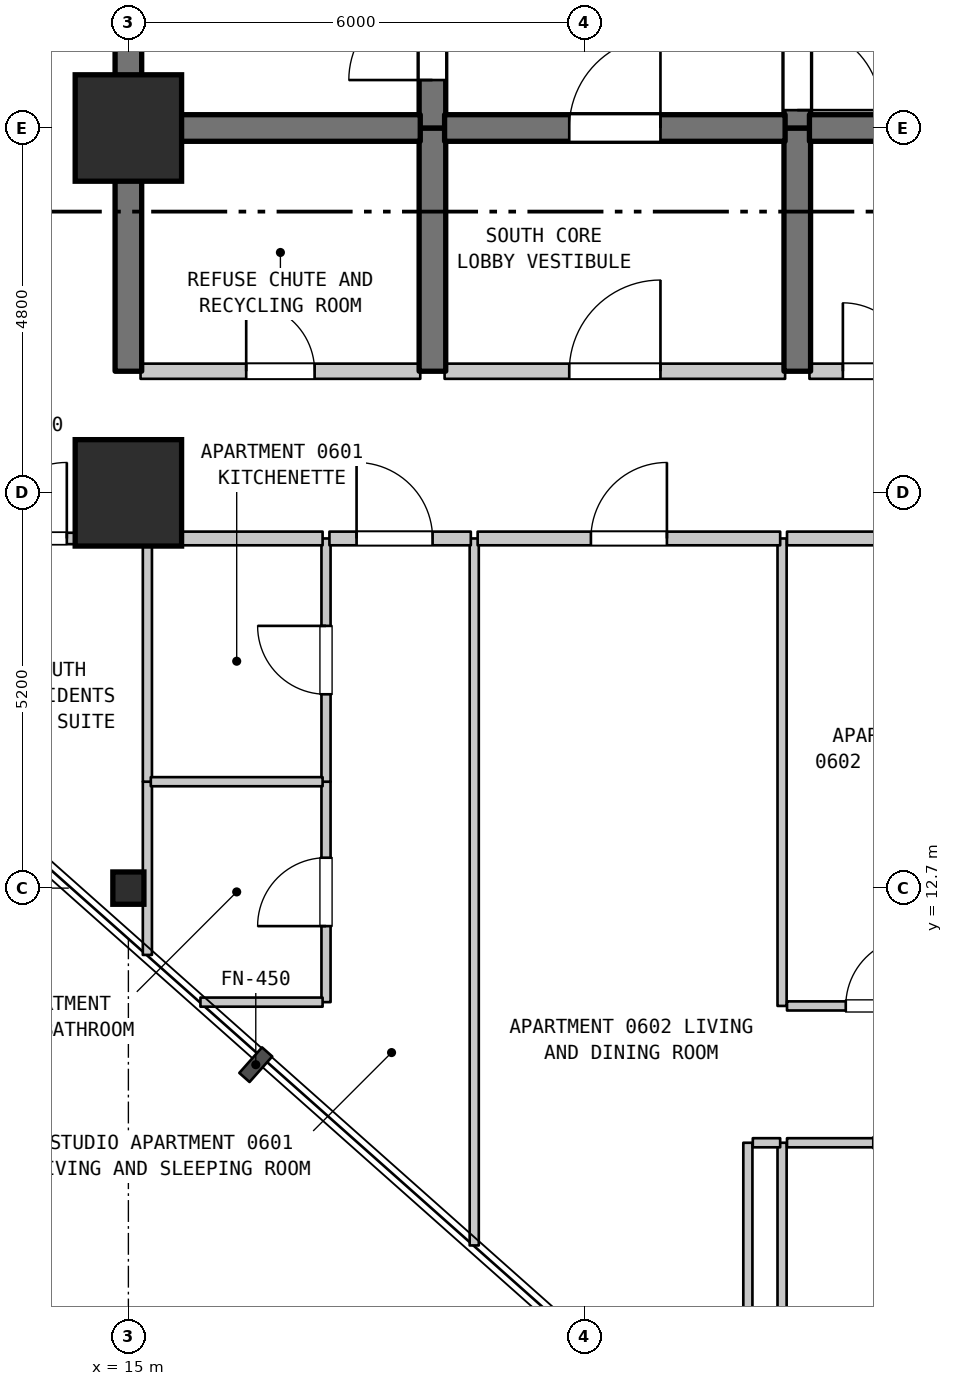
"""IFC4 building model, lengths in metres.
Left out: names, types, materials, properties, quantities, classifications, styles, units other than length and angle.
Written with IfcOpenShell. Run it as: python <this file> out.ifc"""

import sys

from ifc_helpers import new_model, si_unit, direction, frame, frame_2d, origin, origin_2d, place, context, subcontext, project, spatial, rectangle, i_section, extrude, element, fill, save


model = new_model("IFC4")
c1 = context("Model", 3, precision=1e-05, world=origin(), true_north=direction((0.0, 1.0)))
c2 = subcontext(c1, "Body", "Model", "MODEL_VIEW")
j1 = project(units=[si_unit("LENGTHUNIT", "METRE"), si_unit("PLANEANGLEUNIT", "RADIAN")], contexts=[c1])
p1 = place(None, origin())
s1 = spatial("IfcSite", under=j1, at=p1, CompositionType="ELEMENT")
p2 = place(p1, origin())
s2 = spatial("IfcBuilding", under=s1, at=p2, CompositionType="ELEMENT")
p3 = place(p2, frame((0.0, 0.0, 31.4)))
s3 = spatial("IfcBuildingStorey", under=s2, at=p3, CompositionType="ELEMENT", Elevation=31.4)
p4 = place(p3, frame((15.0, 12.7, 0.0), z_axis=(0.0, 0.0, 1.0), x_axis=(1.0, 0.0, 0.0)))
e1 = element("IfcColumn", 1, at=p4, inside=s3, PredefinedType="COLUMN", context=c2, shape_type="SweptSolid", body=[
    extrude(i_section(OverallWidth=0.409, OverallDepth=0.425, WebThickness=0.032, FlangeThickness=0.052, FilletRadius=0.015, at=origin_2d()), origin(), (0.0, 0.0, 1.0), 3.7),
])
for number, where, z_axis, x_axis in (
    (2, (15.0, 17.9, 0.0), (0.0, 0.0, 1.0), (1.0, 0.0, 0.0)),
    (3, (15.0, 22.7, 0.0), (0.0, 0.0, 1.0), (1.0, 0.0, 0.0)),
):
    element("IfcColumn", number, at=place(p3, frame(where, z_axis=z_axis, x_axis=x_axis)), inside=s3, PredefinedType="COLUMN", context=c2, shape_type="SweptSolid", body=[
        extrude(rectangle(XDim=1.4, YDim=1.4, at=origin_2d()), origin(), (0.0, 0.0, 1.0), 3.7),
    ])
p5 = place(p3, frame((15.0, 19.5, 0.0), z_axis=(0.0, 0.0, 1.0), x_axis=(0.0, 1.0, 0.0)))
e4 = element("IfcWall", 4, at=p5, inside=s3, PredefinedType="SHEAR", context=c2, shape_type="SweptSolid", body=[
    extrude(rectangle(XDim=3.2, YDim=0.35, at=frame_2d((1.6, 0.0))), origin(), (0.0, 0.0, 1.0), 3.385),
])
p6 = place(p3, frame((15.0, 22.7, 0.0), z_axis=(0.0, 0.0, 1.0), x_axis=(0.0, 1.0, 0.0)))
e5 = element("IfcWall", 5, at=p6, inside=s3, PredefinedType="SHEAR", context=c2, shape_type="SweptSolid", body=[
    extrude(rectangle(XDim=6.8, YDim=0.35, at=frame_2d((3.4, 0.0))), origin(), (0.0, 0.0, 1.0), 3.385),
])
p7 = place(p3, frame((15.25, 11.821, 0.0), z_axis=(0.0, 0.0, 1.0), x_axis=(0.0, 1.0, 0.0)))
e6 = element("IfcWall", 6, at=p7, inside=s3, PredefinedType="PARTITIONING", context=c2, shape_type="SweptSolid", body=[
    extrude(rectangle(XDim=2.279, YDim=0.12, at=frame_2d((1.14, 0.0))), origin(), (0.0, 0.0, 1.0), 3.385),
])
p8 = place(p3, frame((15.25, 14.1, 0.0), z_axis=(0.0, 0.0, 1.0), x_axis=(0.0, 1.0, 0.0)))
e7 = element("IfcWall", 7, at=p8, inside=s3, PredefinedType="PARTITIONING", context=c2, shape_type="SweptSolid", body=[
    extrude(rectangle(XDim=3.2, YDim=0.12, at=frame_2d((1.6, 0.0))), origin(), (0.0, 0.0, 1.0), 3.385),
])
p9 = place(p3, frame((17.6, 11.2, 0.0), z_axis=(0.0, 0.0, 1.0), x_axis=(0.0, 1.0, 0.0)))
e8 = element("IfcWall", 8, at=p9, inside=s3, PredefinedType="PARTITIONING", context=c2, shape_type="SweptSolid", body=[
    extrude(rectangle(XDim=2.9, YDim=0.12, at=frame_2d((1.45, 0.0))), origin(), (0.0, 0.0, 1.0), 3.385),
])
p10 = place(p9, frame((1.0, 0.0, 0.0)))
e9 = element("IfcOpeningElement", 9, at=p10, cuts=e8, PredefinedType="OPENING", context=c2, shape_type="SweptSolid", body=[
    extrude(rectangle(XDim=0.9, YDim=2.1, at=frame_2d((0.45, 1.05))), frame((0.0, 0.07, 0.0), z_axis=(0.0, -1.0, 0.0), x_axis=(1.0, 0.0, 0.0)), (0.0, 0.0, 1.0), 0.14),
])
p11 = place(p3, frame((17.6, 14.1, 0.0), z_axis=(0.0, 0.0, 1.0), x_axis=(0.0, 1.0, 0.0)))
e10 = element("IfcWall", 10, at=p11, inside=s3, PredefinedType="PARTITIONING", context=c2, shape_type="SweptSolid", body=[
    extrude(rectangle(XDim=3.2, YDim=0.12, at=frame_2d((1.6, 0.0))), origin(), (0.0, 0.0, 1.0), 3.385),
])
p12 = place(p11, frame((1.15, 0.0, 0.0)))
e11 = element("IfcOpeningElement", 11, at=p12, cuts=e10, PredefinedType="OPENING", context=c2, shape_type="SweptSolid", body=[
    extrude(rectangle(XDim=0.9, YDim=2.15, at=frame_2d((0.45, 1.075))), frame((0.0, 0.07, 0.0), z_axis=(0.0, -1.0, 0.0), x_axis=(1.0, 0.0, 0.0)), (0.0, 0.0, 1.0), 0.14),
])
p13 = place(p3, frame((19.0, 19.5, 0.0), z_axis=(0.0, 0.0, 1.0), x_axis=(0.0, 1.0, 0.0)))
e12 = element("IfcWall", 12, at=p13, inside=s3, PredefinedType="SHEAR", context=c2, shape_type="SweptSolid", body=[
    extrude(rectangle(XDim=3.2, YDim=0.35, at=frame_2d((1.6, 0.0))), origin(), (0.0, 0.0, 1.0), 3.385),
])
p14 = place(p3, frame((19.0, 22.7, 0.0), z_axis=(0.0, 0.0, 1.0), x_axis=(0.0, 1.0, 0.0)))
e13 = element("IfcWall", 13, at=p14, inside=s3, PredefinedType="SHEAR", context=c2, shape_type="SweptSolid", body=[
    extrude(rectangle(XDim=5.5, YDim=0.35, at=frame_2d((2.75, 0.0))), origin(), (0.0, 0.0, 1.0), 3.385),
])
p15 = place(p14, frame((0.631, 0.0, 0.0)))
e14 = element("IfcOpeningElement", 14, at=p15, cuts=e13, PredefinedType="OPENING", context=c2, shape_type="SweptSolid", body=[
    extrude(rectangle(XDim=1.1, YDim=2.15, at=frame_2d((0.55, 1.075))), frame((0.0, 0.185, 0.0), z_axis=(0.0, -1.0, 0.0), x_axis=(1.0, 0.0, 0.0)), (0.0, 0.0, 1.0), 0.37),
])
p16 = place(p3, frame((19.55, 7.999, 0.0), z_axis=(0.0, 0.0, 1.0), x_axis=(0.0, 1.0, 0.0)))
e15 = element("IfcWall", 15, at=p16, inside=s3, PredefinedType="PARTITIONING", context=c2, shape_type="SweptSolid", body=[
    extrude(rectangle(XDim=9.301, YDim=0.12, at=frame_2d((4.65, 0.0))), origin(), (0.0, 0.0, 1.0), 3.385),
])
for number, where, z_axis, x_axis in (
    (16, (23.15, 0.71, 0.0), (0.0, 0.0, 1.0), (0.0, 1.0, 0.0)),
    (17, (23.6, 0.71, 0.0), (0.0, 0.0, 1.0), (0.0, 1.0, 0.0)),
):
    element("IfcWall", number, at=place(p3, frame(where, z_axis=z_axis, x_axis=x_axis)), inside=s3, PredefinedType="PARTITIONING", context=c2, shape_type="SweptSolid", body=[
        extrude(rectangle(XDim=8.64, YDim=0.12, at=frame_2d((4.32, 0.0))), origin(), (0.0, 0.0, 1.0), 3.385),
    ])
p17 = place(p3, frame((23.6, 11.15, 0.0), z_axis=(0.0, 0.0, 1.0), x_axis=(0.0, 1.0, 0.0)))
e18 = element("IfcWall", 18, at=p17, inside=s3, PredefinedType="PARTITIONING", context=c2, shape_type="SweptSolid", body=[
    extrude(rectangle(XDim=6.15, YDim=0.12, at=frame_2d((3.075, 0.0))), origin(), (0.0, 0.0, 1.0), 3.385),
])
p18 = place(p3, frame((23.8, 19.5, 0.0), z_axis=(0.0, 0.0, 1.0), x_axis=(0.0, 1.0, 0.0)))
e19 = element("IfcWall", 19, at=p18, inside=s3, PredefinedType="SHEAR", context=c2, shape_type="SweptSolid", body=[
    extrude(rectangle(XDim=3.2, YDim=0.35, at=frame_2d((1.6, 0.0))), origin(), (0.0, 0.0, 1.0), 3.385),
])
p19 = place(p3, frame((23.8, 22.7, 0.0), z_axis=(0.0, 0.0, 1.0), x_axis=(0.0, 1.0, 0.0)))
e20 = element("IfcWall", 20, at=p19, inside=s3, PredefinedType="SHEAR", context=c2, shape_type="SweptSolid", body=[
    extrude(rectangle(XDim=5.5, YDim=0.35, at=frame_2d((2.75, 0.0))), origin(), (0.0, 0.0, 1.0), 3.385),
])
p20 = place(p19, frame((0.235, 0.0, 0.0)))
e21 = element("IfcOpeningElement", 21, at=p20, cuts=e20, PredefinedType="OPENING", context=c2, shape_type="SweptSolid", body=[
    extrude(rectangle(XDim=1.1, YDim=2.15, at=frame_2d((0.55, 1.075))), frame((0.0, 0.185, 0.0), z_axis=(0.0, -1.0, 0.0), x_axis=(1.0, 0.0, 0.0)), (0.0, 0.0, 1.0), 0.37),
])
p21 = place(p3, frame((23.215, 9.35, 0.0), z_axis=(0.0, 0.0, 1.0), x_axis=(1.0, 0.0, 0.0)))
e22 = element("IfcWall", 22, at=p21, inside=s3, PredefinedType="PARTITIONING", context=c2, shape_type="SweptSolid", body=[
    extrude(rectangle(XDim=0.36, YDim=0.12, at=frame_2d((0.18, 0.0))), origin(), (0.0, 0.0, 1.0), 3.385),
])
p22 = place(p3, frame((23.665, 9.35, 0.0), z_axis=(0.0, 0.0, 1.0), x_axis=(1.0, 0.0, 0.0)))
e23 = element("IfcWall", 23, at=p22, inside=s3, PredefinedType="PARTITIONING", context=c2, shape_type="SweptSolid", body=[
    extrude(rectangle(XDim=5.73, YDim=0.12, at=frame_2d((2.865, 0.0))), origin(), (0.0, 0.0, 1.0), 3.385),
])
p23 = place(p22, frame((1.135, 0.0, 0.0)))
e24 = element("IfcOpeningElement", 24, at=p23, cuts=e23, PredefinedType="OPENING", context=c2, shape_type="SweptSolid", body=[
    extrude(rectangle(XDim=0.9, YDim=2.15, at=frame_2d((0.45, 1.075))), frame((0.0, 0.07, 0.0), z_axis=(0.0, -1.0, 0.0), x_axis=(1.0, 0.0, 0.0)), (0.0, 0.0, 1.0), 0.14),
])
p24 = place(p22, frame((3.695, 0.0, 0.0)))
e25 = element("IfcOpeningElement", 25, at=p24, cuts=e23, PredefinedType="OPENING", context=c2, shape_type="SweptSolid", body=[
    extrude(rectangle(XDim=0.9, YDim=2.15, at=frame_2d((0.45, 1.075))), frame((0.0, 0.07, 0.0), z_axis=(0.0, -1.0, 0.0), x_axis=(1.0, 0.0, 0.0)), (0.0, 0.0, 1.0), 0.14),
])
p25 = place(p3, frame((23.665, 11.15, 0.0), z_axis=(0.0, 0.0, 1.0), x_axis=(1.0, 0.0, 0.0)))
e26 = element("IfcWall", 26, at=p25, inside=s3, PredefinedType="PARTITIONING", context=c2, shape_type="SweptSolid", body=[
    extrude(rectangle(XDim=2.587, YDim=0.12, at=frame_2d((1.293, 0.0))), origin(), (0.0, 0.0, 1.0), 3.385),
])
p26 = place(p25, frame((0.773, 0.0, 0.0)))
e27 = element("IfcOpeningElement", 27, at=p26, cuts=e26, PredefinedType="OPENING", context=c2, shape_type="SweptSolid", body=[
    extrude(rectangle(XDim=0.9, YDim=2.15, at=frame_2d((0.45, 1.075))), frame((0.0, 0.07, 0.0), z_axis=(0.0, -1.0, 0.0), x_axis=(1.0, 0.0, 0.0)), (0.0, 0.0, 1.0), 0.14),
])
p27 = place(p3, frame((15.948, 11.2, 0.0), z_axis=(0.0, 0.0, 1.0), x_axis=(1.0, 0.0, 0.0)))
e28 = element("IfcWall", 28, at=p27, inside=s3, PredefinedType="PARTITIONING", context=c2, shape_type="SweptSolid", body=[
    extrude(rectangle(XDim=1.607, YDim=0.12, at=frame_2d((0.803, 0.0))), origin(), (0.0, 0.0, 1.0), 3.385),
])
p28 = place(p3, frame((15.295, 14.1, 0.0), z_axis=(0.0, 0.0, 1.0), x_axis=(1.0, 0.0, 0.0)))
e29 = element("IfcWall", 29, at=p28, inside=s3, PredefinedType="PARTITIONING", context=c2, shape_type="SweptSolid", body=[
    extrude(rectangle(XDim=2.26, YDim=0.12, at=frame_2d((1.13, 0.0))), origin(), (0.0, 0.0, 1.0), 3.385),
])
p29 = place(p3, frame((12.875, 17.3, 0.0), z_axis=(0.0, 0.0, 1.0), x_axis=(1.0, 0.0, 0.0)))
e30 = element("IfcWall", 30, at=p29, inside=s3, PredefinedType="STANDARD", context=c2, shape_type="SweptSolid", body=[
    extrude(rectangle(XDim=2.33, YDim=0.15, at=frame_2d((1.165, 0.0))), origin(), (0.0, 0.0, 1.0), 3.385),
])
p30 = place(p29, frame((0.315, 0.0, 0.0)))
e31 = element("IfcOpeningElement", 31, at=p30, cuts=e30, PredefinedType="OPENING", context=c2, shape_type="SweptSolid", body=[
    extrude(rectangle(XDim=1.0, YDim=2.15, at=frame_2d((0.5, 1.075))), frame((0.0, 0.085, 0.0), z_axis=(0.0, -1.0, 0.0), x_axis=(1.0, 0.0, 0.0)), (0.0, 0.0, 1.0), 0.17),
])
p31 = place(p3, frame((15.295, 17.3, 0.0), z_axis=(0.0, 0.0, 1.0), x_axis=(1.0, 0.0, 0.0)))
e32 = element("IfcWall", 32, at=p31, inside=s3, PredefinedType="STANDARD", context=c2, shape_type="SweptSolid", body=[
    extrude(rectangle(XDim=2.26, YDim=0.18, at=frame_2d((1.13, 0.0))), origin(), (0.0, 0.0, 1.0), 3.385),
])
p32 = place(p3, frame((17.645, 17.3, 0.0), z_axis=(0.0, 0.0, 1.0), x_axis=(1.0, 0.0, 0.0)))
e33 = element("IfcWall", 33, at=p32, inside=s3, PredefinedType="STANDARD", context=c2, shape_type="SweptSolid", body=[
    extrude(rectangle(XDim=1.86, YDim=0.18, at=frame_2d((0.93, 0.0))), origin(), (0.0, 0.0, 1.0), 3.385),
])
p33 = place(p32, frame((0.357, 0.0, 0.0)))
e34 = element("IfcOpeningElement", 34, at=p33, cuts=e33, PredefinedType="OPENING", context=c2, shape_type="SweptSolid", body=[
    extrude(rectangle(XDim=1.0, YDim=2.15, at=frame_2d((0.5, 1.075))), frame((0.0, 0.1, 0.0), z_axis=(0.0, -1.0, 0.0), x_axis=(1.0, 0.0, 0.0)), (0.0, 0.0, 1.0), 0.2),
])
p34 = place(p3, frame((19.595, 17.3, 0.0), z_axis=(0.0, 0.0, 1.0), x_axis=(1.0, 0.0, 0.0)))
e35 = element("IfcWall", 35, at=p34, inside=s3, PredefinedType="STANDARD", context=c2, shape_type="SweptSolid", body=[
    extrude(rectangle(XDim=3.98, YDim=0.18, at=frame_2d((1.99, 0.0))), origin(), (0.0, 0.0, 1.0), 3.385),
])
p35 = place(p34, frame((1.49, 0.0, 0.0)))
e36 = element("IfcOpeningElement", 36, at=p35, cuts=e35, PredefinedType="OPENING", context=c2, shape_type="SweptSolid", body=[
    extrude(rectangle(XDim=1.0, YDim=2.15, at=frame_2d((0.5, 1.075))), frame((0.0, 0.1, 0.0), z_axis=(0.0, -1.0, 0.0), x_axis=(1.0, 0.0, 0.0)), (0.0, 0.0, 1.0), 0.2),
])
p36 = place(p3, frame((23.665, 17.3, 0.0), z_axis=(0.0, 0.0, 1.0), x_axis=(1.0, 0.0, 0.0)))
e37 = element("IfcWall", 37, at=p36, inside=s3, PredefinedType="STANDARD", context=c2, shape_type="SweptSolid", body=[
    extrude(rectangle(XDim=2.587, YDim=0.18, at=frame_2d((1.293, 0.0))), origin(), (0.0, 0.0, 1.0), 3.385),
])
p37 = place(p3, frame((15.16, 19.5, 0.0), z_axis=(0.0, 0.0, 1.0), x_axis=(1.0, 0.0, 0.0)))
e38 = element("IfcWall", 38, at=p37, inside=s3, PredefinedType="STANDARD", context=c2, shape_type="SweptSolid", body=[
    extrude(rectangle(XDim=3.68, YDim=0.2, at=frame_2d((1.84, 0.0))), origin(), (0.0, 0.0, 1.0), 3.385),
])
p38 = place(p37, frame((1.39, 0.0, 0.0)))
e39 = element("IfcOpeningElement", 39, at=p38, cuts=e38, PredefinedType="OPENING", context=c2, shape_type="SweptSolid", body=[
    extrude(rectangle(XDim=0.9, YDim=2.15, at=frame_2d((0.45, 1.075))), frame((0.0, 0.11, 0.0), z_axis=(0.0, -1.0, 0.0), x_axis=(1.0, 0.0, 0.0)), (0.0, 0.0, 1.0), 0.22),
])
p39 = place(p3, frame((19.16, 19.5, 0.0), z_axis=(0.0, 0.0, 1.0), x_axis=(1.0, 0.0, 0.0)))
e40 = element("IfcWall", 40, at=p39, inside=s3, PredefinedType="STANDARD", context=c2, shape_type="SweptSolid", body=[
    extrude(rectangle(XDim=4.48, YDim=0.2, at=frame_2d((2.24, 0.0))), origin(), (0.0, 0.0, 1.0), 3.385),
])
p40 = place(p39, frame((1.64, 0.0, 0.0)))
e41 = element("IfcOpeningElement", 41, at=p40, cuts=e40, PredefinedType="OPENING", context=c2, shape_type="SweptSolid", body=[
    extrude(rectangle(XDim=1.2, YDim=2.2, at=frame_2d((0.6, 1.1))), frame((0.0, 0.11, 0.0), z_axis=(0.0, -1.0, 0.0), x_axis=(1.0, 0.0, 0.0)), (0.0, 0.0, 1.0), 0.22),
])
p41 = place(p3, frame((23.96, 19.5, 0.0), z_axis=(0.0, 0.0, 1.0), x_axis=(1.0, 0.0, 0.0)))
e42 = element("IfcWall", 42, at=p41, inside=s3, PredefinedType="STANDARD", context=c2, shape_type="SweptSolid", body=[
    extrude(rectangle(XDim=1.855, YDim=0.2, at=frame_2d((0.927, 0.0))), origin(), (0.0, 0.0, 1.0), 3.385),
])
p42 = place(p41, frame((0.44, 0.0, 0.0)))
e43 = element("IfcOpeningElement", 43, at=p42, cuts=e42, PredefinedType="OPENING", context=c2, shape_type="SweptSolid", body=[
    extrude(rectangle(XDim=0.9, YDim=2.15, at=frame_2d((0.45, 1.075))), frame((0.0, 0.11, 0.0), z_axis=(0.0, -1.0, 0.0), x_axis=(1.0, 0.0, 0.0)), (0.0, 0.0, 1.0), 0.22),
])
p43 = place(p3, frame((15.16, 22.7, 0.0), z_axis=(0.0, 0.0, 1.0), x_axis=(1.0, 0.0, 0.0)))
e44 = element("IfcWall", 44, at=p43, inside=s3, PredefinedType="SHEAR", context=c2, shape_type="SweptSolid", body=[
    extrude(rectangle(XDim=3.68, YDim=0.35, at=frame_2d((1.84, 0.0))), origin(), (0.0, 0.0, 1.0), 3.385),
])
p44 = place(p3, frame((19.16, 22.7, 0.0), z_axis=(0.0, 0.0, 1.0), x_axis=(1.0, 0.0, 0.0)))
e45 = element("IfcWall", 45, at=p44, inside=s3, PredefinedType="SHEAR", context=c2, shape_type="SweptSolid", body=[
    extrude(rectangle(XDim=4.48, YDim=0.35, at=frame_2d((2.24, 0.0))), origin(), (0.0, 0.0, 1.0), 3.385),
])
p45 = place(p44, frame((1.64, 0.0, 0.0)))
e46 = element("IfcOpeningElement", 46, at=p45, cuts=e45, PredefinedType="OPENING", context=c2, shape_type="SweptSolid", body=[
    extrude(rectangle(XDim=1.2, YDim=2.2, at=frame_2d((0.6, 1.1))), frame((0.0, 0.185, 0.0), z_axis=(0.0, -1.0, 0.0), x_axis=(1.0, 0.0, 0.0)), (0.0, 0.0, 1.0), 0.37),
])
p46 = place(p3, frame((23.96, 22.7, 0.0), z_axis=(0.0, 0.0, 1.0), x_axis=(1.0, 0.0, 0.0)))
e47 = element("IfcWall", 47, at=p46, inside=s3, PredefinedType="SHEAR", context=c2, shape_type="SweptSolid", body=[
    extrude(rectangle(XDim=1.855, YDim=0.35, at=frame_2d((0.927, 0.0))), origin(), (0.0, 0.0, 1.0), 3.385),
])
p47 = place(p10, origin())
e48 = element("IfcDoor", 48, at=p47, inside=s3, OperationType="SINGLE_SWING_LEFT", PredefinedType="DOOR", context=c2, shape_type="SweptSolid", body=[
    extrude(rectangle(XDim=0.9, YDim=2.1, at=frame_2d((0.45, 1.05))), frame((0.0, 0.025, 0.0), z_axis=(0.0, -1.0, 0.0), x_axis=(1.0, 0.0, 0.0)), (0.0, 0.0, 1.0), 0.05),
])
fill(e9, e48)
p48 = place(p12, origin())
e49 = element("IfcDoor", 49, at=p48, inside=s3, OperationType="SINGLE_SWING_RIGHT", PredefinedType="DOOR", context=c2, shape_type="SweptSolid", body=[
    extrude(rectangle(XDim=0.9, YDim=2.15, at=frame_2d((0.45, 1.075))), frame((0.0, 0.025, 0.0), z_axis=(0.0, -1.0, 0.0), x_axis=(1.0, 0.0, 0.0)), (0.0, 0.0, 1.0), 0.05),
])
fill(e11, e49)
p49 = place(p15, origin())
e50 = element("IfcDoor", 50, at=p49, inside=s3, OperationType="SINGLE_SWING_LEFT", PredefinedType="DOOR", context=c2, shape_type="SweptSolid", body=[
    extrude(rectangle(XDim=1.1, YDim=2.15, at=frame_2d((0.55, 1.075))), frame((0.0, 0.025, 0.0), z_axis=(0.0, -1.0, 0.0), x_axis=(1.0, 0.0, 0.0)), (0.0, 0.0, 1.0), 0.05),
])
fill(e14, e50)
p50 = place(p20, frame((1.1, 0.0, 0.0), z_axis=(0.0, 0.0, 1.0), x_axis=(-1.0, 0.0, 0.0)))
e51 = element("IfcDoor", 51, at=p50, inside=s3, OperationType="SINGLE_SWING_LEFT", PredefinedType="DOOR", context=c2, shape_type="SweptSolid", body=[
    extrude(rectangle(XDim=1.1, YDim=2.15, at=frame_2d((0.55, 1.075))), frame((0.0, 0.025, 0.0), z_axis=(0.0, -1.0, 0.0), x_axis=(1.0, 0.0, 0.0)), (0.0, 0.0, 1.0), 0.05),
])
fill(e21, e51)
p51 = place(p26, origin())
e52 = element("IfcDoor", 52, at=p51, inside=s3, OperationType="SINGLE_SWING_RIGHT", PredefinedType="DOOR", context=c2, shape_type="SweptSolid", body=[
    extrude(rectangle(XDim=0.9, YDim=2.15, at=frame_2d((0.45, 1.075))), frame((0.0, 0.025, 0.0), z_axis=(0.0, -1.0, 0.0), x_axis=(1.0, 0.0, 0.0)), (0.0, 0.0, 1.0), 0.05),
])
fill(e27, e52)
p52 = place(p30, origin())
e53 = element("IfcDoor", 53, at=p52, inside=s3, OperationType="SINGLE_SWING_RIGHT", PredefinedType="DOOR", context=c2, shape_type="SweptSolid", body=[
    extrude(rectangle(XDim=1.0, YDim=2.15, at=frame_2d((0.5, 1.075))), frame((0.0, 0.025, 0.0), z_axis=(0.0, -1.0, 0.0), x_axis=(1.0, 0.0, 0.0)), (0.0, 0.0, 1.0), 0.05),
])
fill(e31, e53)
p53 = place(p33, origin())
e54 = element("IfcDoor", 54, at=p53, inside=s3, OperationType="SINGLE_SWING_LEFT", PredefinedType="DOOR", context=c2, shape_type="SweptSolid", body=[
    extrude(rectangle(XDim=1.0, YDim=2.15, at=frame_2d((0.5, 1.075))), frame((0.0, 0.025, 0.0), z_axis=(0.0, -1.0, 0.0), x_axis=(1.0, 0.0, 0.0)), (0.0, 0.0, 1.0), 0.05),
])
fill(e34, e54)
p54 = place(p35, origin())
e55 = element("IfcDoor", 55, at=p54, inside=s3, OperationType="SINGLE_SWING_RIGHT", PredefinedType="DOOR", context=c2, shape_type="SweptSolid", body=[
    extrude(rectangle(XDim=1.0, YDim=2.15, at=frame_2d((0.5, 1.075))), frame((0.0, 0.025, 0.0), z_axis=(0.0, -1.0, 0.0), x_axis=(1.0, 0.0, 0.0)), (0.0, 0.0, 1.0), 0.05),
])
fill(e36, e55)
p55 = place(p38, origin())
e56 = element("IfcDoor", 56, at=p55, inside=s3, OperationType="SINGLE_SWING_LEFT", PredefinedType="DOOR", context=c2, shape_type="SweptSolid", body=[
    extrude(rectangle(XDim=0.9, YDim=2.15, at=frame_2d((0.45, 1.075))), frame((0.0, 0.025, 0.0), z_axis=(0.0, -1.0, 0.0), x_axis=(1.0, 0.0, 0.0)), (0.0, 0.0, 1.0), 0.05),
])
fill(e39, e56)
p56 = place(p40, origin())
e57 = element("IfcDoor", 57, at=p56, inside=s3, OperationType="SINGLE_SWING_RIGHT", PredefinedType="DOOR", context=c2, shape_type="SweptSolid", body=[
    extrude(rectangle(XDim=1.2, YDim=2.2, at=frame_2d((0.6, 1.1))), frame((0.0, 0.025, 0.0), z_axis=(0.0, -1.0, 0.0), x_axis=(1.0, 0.0, 0.0)), (0.0, 0.0, 1.0), 0.05),
])
fill(e41, e57)
p57 = place(p42, origin())
e58 = element("IfcDoor", 58, at=p57, inside=s3, OperationType="SINGLE_SWING_LEFT", PredefinedType="DOOR", context=c2, shape_type="SweptSolid", body=[
    extrude(rectangle(XDim=0.9, YDim=2.15, at=frame_2d((0.45, 1.075))), frame((0.0, 0.025, 0.0), z_axis=(0.0, -1.0, 0.0), x_axis=(1.0, 0.0, 0.0)), (0.0, 0.0, 1.0), 0.05),
])
fill(e43, e58)
p58 = place(p45, origin())
e59 = element("IfcDoor", 59, at=p58, inside=s3, OperationType="SINGLE_SWING_RIGHT", PredefinedType="DOOR", context=c2, shape_type="SweptSolid", body=[
    extrude(rectangle(XDim=1.2, YDim=2.2, at=frame_2d((0.6, 1.1))), frame((0.0, 0.025, 0.0), z_axis=(0.0, -1.0, 0.0), x_axis=(1.0, 0.0, 0.0)), (0.0, 0.0, 1.0), 0.05),
])
fill(e46, e59)
save(model, sys.argv[1])
